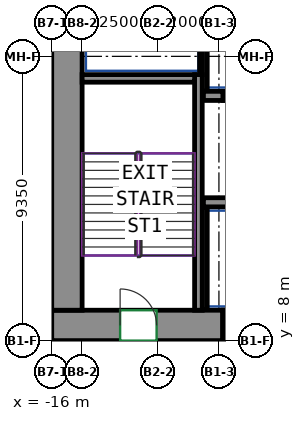
"""IFC4 building model, lengths in metres.
Left out: names, types, materials, properties, quantities, classifications, styles, units other than length and angle.
Written with IfcOpenShell. Run it as: python <this file> out.ifc"""

import sys

from ifc_helpers import new_model, si_unit, direction, frame, frame_2d, origin, place, context, subcontext, project, spatial, rectangle, extrude, source, transform, mapped, element, fill, save


model = new_model("IFC4")
c1 = context("Model", 3, precision=1e-05, world=origin(), true_north=direction((0.0, 1.0)))
c2 = subcontext(c1, "Body", "Model", "MODEL_VIEW")
j1 = project(units=[si_unit("LENGTHUNIT", "METRE"), si_unit("PLANEANGLEUNIT", "RADIAN")], contexts=[c1])
p1 = place(None, origin())
s1 = spatial("IfcSite", under=j1, at=p1, CompositionType="ELEMENT")
p2 = place(p1, origin())
s2 = spatial("IfcBuilding", under=s1, at=p2, CompositionType="ELEMENT")
p3 = place(p2, frame((0.0, 0.0, 22.5)))
s3 = spatial("IfcBuildingStorey", under=s2, at=p3, CompositionType="ELEMENT", Elevation=22.5)
m1 = source(origin(), c2, "Body", "SweptSolid", [
    extrude(rectangle(XDim=5.63, YDim=1.0, at=frame_2d((2.815, 0.0))), origin(), (0.0, 0.0, 1.0), 4.22),
])
p4 = place(p3, frame((-16.0, 8.5, 0.0), z_axis=(0.0, 0.0, 1.0), x_axis=(1.0, 0.0, 0.0)))
e1 = element("IfcWall", 1, at=p4, inside=s3, PredefinedType="SHEAR", context=c2, shape_type="MappedRepresentation", body=[
    mapped(m1, transform((0.0, 0.0, 0.0))),
])
p5 = place(p4, frame((2.25, 0.0, 0.0)))
e2 = element("IfcOpeningElement", 2, at=p5, cuts=e1, PredefinedType="OPENING", context=c2, shape_type="SweptSolid", body=[
    extrude(rectangle(XDim=1.2, YDim=2.1, at=frame_2d((0.6, 1.05))), frame((0.0, 0.51, 0.0), z_axis=(0.0, -1.0, 0.0), x_axis=(1.0, 0.0, 0.0)), (0.0, 0.0, 1.0), 1.02),
])
m2 = source(origin(), c2, "Body", "SweptSolid", [
    extrude(rectangle(XDim=12.0, YDim=1.0, at=frame_2d((6.0, 0.0))), origin(), (0.0, 0.0, 1.0), 4.22),
])
p6 = place(p3, frame((-15.5, 9.0, 0.0), z_axis=(0.0, 0.0, 1.0), x_axis=(0.0, 1.0, 0.0)))
e3 = element("IfcWall", 3, at=p6, inside=s3, PredefinedType="SHEAR", context=c2, shape_type="MappedRepresentation", body=[
    mapped(m2, transform((0.0, 0.0, 0.0))),
])
m3 = source(origin(), c2, "Body", "SweptSolid", [
    extrude(rectangle(XDim=7.75, YDim=0.25, at=frame_2d((3.875, 0.0))), origin(), (0.0, 0.0, 1.0), 4.22),
])
p7 = place(p3, frame((-11.175, 9.0, 0.0), z_axis=(0.0, 0.0, 1.0), x_axis=(0.0, 1.0, 0.0)))
e4 = element("IfcWall", 4, at=p7, inside=s3, PredefinedType="SHEAR", context=c2, shape_type="MappedRepresentation", body=[
    mapped(m3, transform((0.0, 0.0, 0.0))),
])
m4 = source(origin(), c2, "Body", "SweptSolid", [
    extrude(rectangle(XDim=3.7, YDim=0.25, at=frame_2d((1.85, 0.0))), origin(), (0.0, 0.0, 1.0), 4.22),
])
p8 = place(p3, frame((-15.0, 16.625, 0.0), z_axis=(0.0, 0.0, 1.0), x_axis=(1.0, 0.0, 0.0)))
e5 = element("IfcWall", 5, at=p8, inside=s3, PredefinedType="SHEAR", context=c2, shape_type="MappedRepresentation", body=[
    mapped(m4, transform((0.0, 0.0, 0.0))),
])
m5 = source(origin(), c2, "Body", "SweptSolid", [
    extrude(rectangle(XDim=6.0, YDim=0.3, at=frame_2d((3.0, 0.0))), origin(), (0.0, 0.0, 1.0), 4.22),
])
p9 = place(p3, frame((-11.01, 12.55, 0.0), z_axis=(0.0, 0.0, 1.0), x_axis=(1.0, 0.0, 0.0)))
e6 = element("IfcWall", 6, at=p9, inside=s3, PredefinedType="SHEAR", context=c2, shape_type="MappedRepresentation", body=[
    mapped(m5, transform((0.0, 0.0, 0.0))),
])
m6 = source(origin(), c2, "Body", "SweptSolid", [
    extrude(rectangle(XDim=0.64, YDim=0.3, at=frame_2d((0.32, 0.0))), origin(), (0.0, 0.0, 1.0), 4.22),
])
p10 = place(p3, frame((-11.01, 16.05, 0.0), z_axis=(0.0, 0.0, 1.0), x_axis=(1.0, 0.0, 0.0)))
e7 = element("IfcWall", 7, at=p10, inside=s3, PredefinedType="SHEAR", context=c2, shape_type="MappedRepresentation", body=[
    mapped(m6, transform((0.0, 0.0, 0.0))),
])
m7 = source(origin(), c2, "Body", "SweptSolid", [
    extrude(rectangle(XDim=1.4, YDim=1.0, at=frame_2d((0.7, 0.0))), origin(), (0.0, 0.0, 1.0), 0.32),
])
p11 = place(p3, frame((-10.37, 8.5, 3.9), z_axis=(0.0, 0.0, 1.0), x_axis=(1.0, 0.0, 0.0)))
e8 = element("IfcWall", 8, at=p11, inside=s3, PredefinedType="SHEAR", context=c2, shape_type="MappedRepresentation", body=[
    mapped(m7, transform((0.0, 0.0, 0.0))),
])
m8 = source(origin(), c2, "Body", "SweptSolid", [
    extrude(rectangle(XDim=1.4, YDim=0.3, at=frame_2d((0.7, 0.0))), origin(), (0.0, 0.0, 1.0), 4.22),
])
p12 = place(p3, frame((-10.37, 16.05, 0.0), z_axis=(0.0, 0.0, 1.0), x_axis=(1.0, 0.0, 0.0)))
e9 = element("IfcWall", 9, at=p12, inside=s3, PredefinedType="PARTITIONING", context=c2, shape_type="MappedRepresentation", body=[
    mapped(m8, transform((0.0, 0.0, 0.0))),
])
p13 = place(p12, frame((0.15, 0.0, 0.0)))
e10 = element("IfcOpeningElement", 10, at=p13, cuts=e9, PredefinedType="OPENING", context=c2, shape_type="SweptSolid", body=[
    extrude(rectangle(XDim=1.1, YDim=2.1, at=frame_2d((0.55, 1.05))), frame((0.0, 0.16, 0.0), z_axis=(0.0, -1.0, 0.0), x_axis=(1.0, 0.0, 0.0)), (0.0, 0.0, 1.0), 0.32),
])
m9 = source(origin(), c2, "Body", "SweptSolid", [
    extrude(rectangle(XDim=3.275, YDim=0.165, at=frame_2d((1.638, 0.0))), origin(), (0.0, 0.0, 1.0), 4.22),
])
p14 = place(p3, frame((-10.968, 16.2, 0.0), z_axis=(0.0, 0.0, 1.0), x_axis=(0.0, 1.0, 0.0)))
e11 = element("IfcWall", 11, at=p14, inside=s3, PredefinedType="PARTITIONING", context=c2, shape_type="MappedRepresentation", body=[
    mapped(m9, transform((0.0, 0.0, 0.0))),
])
m10 = source(origin(), c2, "Body", "SweptSolid", [
    extrude(rectangle(XDim=2.725, YDim=0.085, at=frame_2d((1.363, 0.0))), origin(), (0.0, 0.0, 1.0), 4.22),
])
p15 = place(p3, frame((-11.093, 16.75, 0.0), z_axis=(0.0, 0.0, 1.0), x_axis=(0.0, 1.0, 0.0)))
e12 = element("IfcWall", 12, at=p15, inside=s3, PredefinedType="PARTITIONING", context=c2, shape_type="MappedRepresentation", body=[
    mapped(m10, transform((0.0, 0.0, 0.0))),
])
m11 = source(origin(), c2, "Body", "SweptSolid", [
    extrude(rectangle(XDim=3.4, YDim=0.165, at=frame_2d((1.7, 0.0))), origin(), (0.0, 0.0, 1.0), 4.22),
])
p16 = place(p3, frame((-10.968, 9.0, 0.0), z_axis=(0.0, 0.0, 1.0), x_axis=(0.0, 1.0, 0.0)))
e13 = element("IfcWall", 13, at=p16, inside=s3, PredefinedType="PARTITIONING", context=c2, shape_type="MappedRepresentation", body=[
    mapped(m11, transform((0.0, 0.0, 0.0))),
])
m12 = source(origin(), c2, "Body", "SweptSolid", [
    extrude(rectangle(XDim=1.4, YDim=1.0, at=frame_2d((0.7, 0.0))), origin(), (0.0, 0.0, 1.0), 2.7),
])
p17 = place(p3, frame((-10.37, 8.5, 0.0), z_axis=(0.0, 0.0, 1.0), x_axis=(1.0, 0.0, 0.0)))
e14 = element("IfcWall", 14, at=p17, inside=s3, PredefinedType="PARTITIONING", context=c2, shape_type="MappedRepresentation", body=[
    mapped(m12, transform((0.0, 0.0, 0.0))),
])
p18 = place(p17, frame((0.25, 0.0, 0.0)))
e15 = element("IfcOpeningElement", 15, at=p18, cuts=e14, PredefinedType="OPENING", context=c2, shape_type="SweptSolid", body=[
    extrude(rectangle(XDim=0.9, YDim=2.1, at=frame_2d((0.45, 1.05))), frame((0.0, 0.51, 0.0), z_axis=(0.0, -1.0, 0.0), x_axis=(1.0, 0.0, 0.0)), (0.0, 0.0, 1.0), 1.02),
])
p19 = place(p5, origin())
e16 = element("IfcDoor", 16, at=p19, inside=s3, OperationType="DOUBLE_DOOR_SINGLE_SWING", PredefinedType="DOOR", context=c2, shape_type="SweptSolid", body=[
    extrude(rectangle(XDim=1.2, YDim=2.1, at=frame_2d((0.6, 1.05))), frame((0.0, 0.405, 0.0), z_axis=(0.0, -1.0, 0.0), x_axis=(1.0, 0.0, 0.0)), (0.0, 0.0, 1.0), 0.05),
])
fill(e2, e16)
save(model, sys.argv[1])
